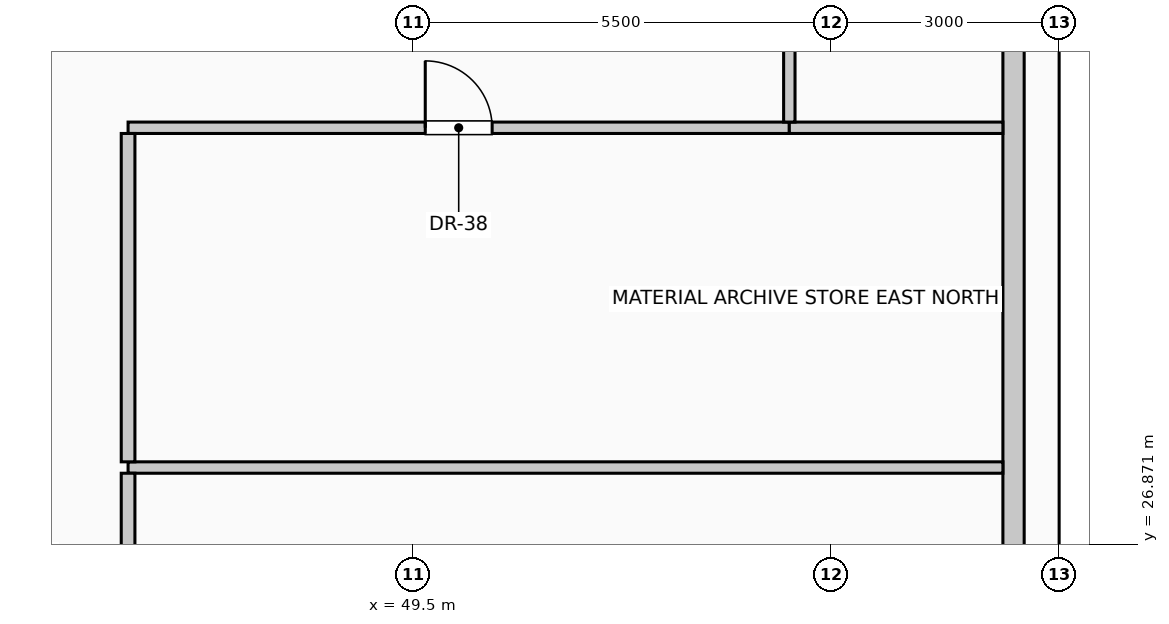
"""IFC4 building model, lengths in metres.
Left out: names, types, materials, properties, quantities, classifications, styles, units other than length and angle.
Written with IfcOpenShell. Run it as: python <this file> out.ifc"""

import sys

from ifc_helpers import new_model, si_unit, direction, frame, frame_2d, origin, place, context, subcontext, project, spatial, rectangle, extrude, element, fill, save


model = new_model("IFC4")
c1 = context("Model", 3, precision=1e-05, world=origin(), true_north=direction((0.0, 1.0)))
c2 = subcontext(c1, "Body", "Model", "MODEL_VIEW")
j1 = project(units=[si_unit("LENGTHUNIT", "METRE"), si_unit("PLANEANGLEUNIT", "RADIAN")], contexts=[c1])
p1 = place(None, origin())
s1 = spatial("IfcSite", under=j1, at=p1, CompositionType="ELEMENT")
p2 = place(p1, origin())
s2 = spatial("IfcBuilding", under=s1, at=p2, CompositionType="ELEMENT")
p3 = place(p2, frame((0.0, 0.0, 58.6)))
s3 = spatial("IfcBuildingStorey", under=s2, at=p3, CompositionType="ELEMENT", Elevation=58.6)
p4 = place(p3, frame((57.4, 33.53, 0.0), z_axis=(0.0, 0.0, 1.0), x_axis=(0.0, -1.0, 0.0)))
e1 = element("IfcWall", 1, at=p4, inside=s3, PredefinedType="SOLIDWALL", context=c2, shape_type="SweptSolid", body=[
    extrude(rectangle(XDim=7.06, YDim=0.28, at=frame_2d((3.53, 0.0))), origin(), (0.0, 0.0, 1.0), 2.85),
])
p5 = place(p3, frame((45.75, 27.88, 0.0), z_axis=(0.0, 0.0, 1.0), x_axis=(1.0, 0.0, 0.0)))
e2 = element("IfcWall", 2, at=p5, inside=s3, PredefinedType="PARTITIONING", context=c2, shape_type="SweptSolid", body=[
    extrude(rectangle(XDim=11.51, YDim=0.15, at=frame_2d((5.755, 0.0))), origin(), (0.0, 0.0, 1.0), 3.7),
])
p6 = place(p3, frame((45.75, 32.35, 0.0), z_axis=(0.0, 0.0, 1.0), x_axis=(1.0, 0.0, 0.0)))
e3 = element("IfcWall", 3, at=p6, inside=s3, PredefinedType="PARTITIONING", context=c2, shape_type="SweptSolid", body=[
    extrude(rectangle(XDim=8.7, YDim=0.15, at=frame_2d((4.35, 0.0))), origin(), (0.0, 0.0, 1.0), 3.7),
])
p7 = place(p6, frame((3.91, 0.0, 0.0)))
e4 = element("IfcOpeningElement", 4, at=p7, cuts=e3, PredefinedType="OPENING", context=c2, shape_type="SweptSolid", body=[
    extrude(rectangle(XDim=0.88, YDim=2.1, at=frame_2d((0.44, 1.05))), frame((0.0, 0.085, 0.0), z_axis=(0.0, -1.0, 0.0), x_axis=(1.0, 0.0, 0.0)), (0.0, 0.0, 1.0), 0.17),
])
p8 = place(p3, frame((54.45, 32.35, 0.0), z_axis=(0.0, 0.0, 1.0), x_axis=(1.0, 0.0, 0.0)))
e5 = element("IfcWall", 5, at=p8, inside=s3, PredefinedType="PARTITIONING", context=c2, shape_type="SweptSolid", body=[
    extrude(rectangle(XDim=2.81, YDim=0.15, at=frame_2d((1.405, 0.0))), origin(), (0.0, 0.0, 1.0), 3.7),
])
p9 = place(p3, frame((45.75, 21.19, 0.0), z_axis=(0.0, 0.0, 1.0), x_axis=(0.0, 1.0, 0.0)))
e6 = element("IfcWall", 6, at=p9, inside=s3, PredefinedType="PARTITIONING", context=c2, shape_type="SweptSolid", body=[
    extrude(rectangle(XDim=6.615, YDim=0.18, at=frame_2d((3.308, 0.0))), origin(), (0.0, 0.0, 1.0), 3.7),
])
p10 = place(p3, frame((45.75, 27.955, 0.0), z_axis=(0.0, 0.0, 1.0), x_axis=(0.0, 1.0, 0.0)))
e7 = element("IfcWall", 7, at=p10, inside=s3, PredefinedType="PARTITIONING", context=c2, shape_type="SweptSolid", body=[
    extrude(rectangle(XDim=4.32, YDim=0.18, at=frame_2d((2.16, 0.0))), origin(), (0.0, 0.0, 1.0), 3.7),
])
p11 = place(p3, frame((54.45, 32.425, 0.0), z_axis=(0.0, 0.0, 1.0), x_axis=(0.0, 1.0, 0.0)))
e8 = element("IfcWall", 8, at=p11, inside=s3, PredefinedType="PARTITIONING", context=c2, shape_type="SweptSolid", body=[
    extrude(rectangle(XDim=1.725, YDim=0.15, at=frame_2d((0.862, 0.0))), origin(), (0.0, 0.0, 1.0), 3.7),
])
p12 = place(p7, origin())
e9 = element("IfcDoor", 9, at=p12, inside=s3, OperationType="SINGLE_SWING_LEFT", PredefinedType="DOOR", context=c2, shape_type="SweptSolid", body=[
    extrude(rectangle(XDim=0.88, YDim=2.1, at=frame_2d((0.44, 1.05))), frame((0.0, 0.025, 0.0), z_axis=(0.0, -1.0, 0.0), x_axis=(1.0, 0.0, 0.0)), (0.0, 0.0, 1.0), 0.05),
])
fill(e4, e9)
save(model, sys.argv[1])
